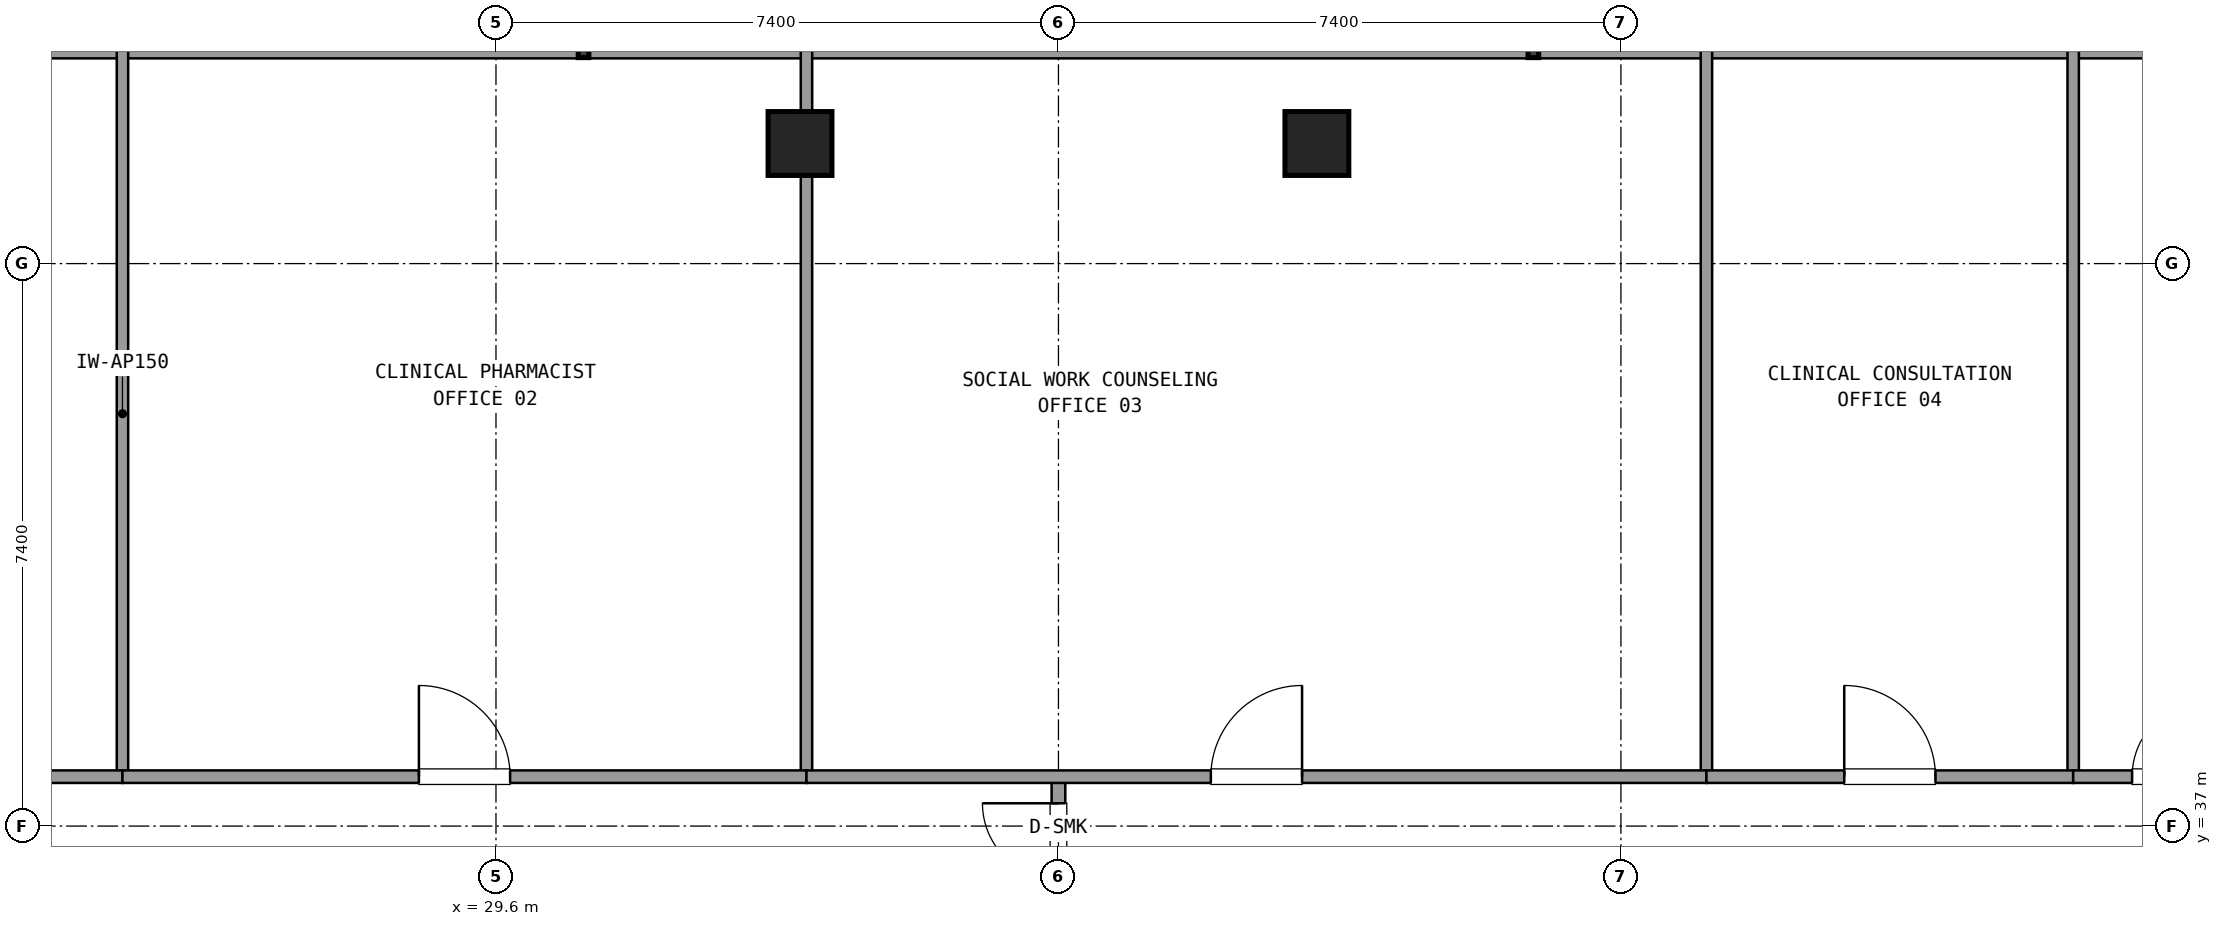
"""IFC4 building model, lengths in metres.
Left out: names, types, materials, properties, quantities, classifications, styles, units other than length and angle.
Written with IfcOpenShell. Run it as: python <this file> out.ifc"""

import sys

from ifc_helpers import new_model, si_unit, direction, frame, frame_2d, origin, origin_2d, place, context, subcontext, project, spatial, rectangle, extrude, element, fill, save


model = new_model("IFC4")
c1 = context("Model", 3, precision=1e-05, world=origin(), true_north=direction((0.0, 1.0)))
c2 = subcontext(c1, "Body", "Model", "MODEL_VIEW")
j1 = project(units=[si_unit("LENGTHUNIT", "METRE"), si_unit("PLANEANGLEUNIT", "RADIAN")], contexts=[c1])
p1 = place(None, origin())
s1 = spatial("IfcSite", under=j1, at=p1, CompositionType="ELEMENT")
p2 = place(p1, origin())
s2 = spatial("IfcBuilding", under=s1, at=p2, CompositionType="ELEMENT")
p3 = place(p2, frame((0.0, 0.0, 242.82)))
s3 = spatial("IfcBuildingStorey", under=s2, at=p3, CompositionType="ELEMENT", Elevation=242.82)
for number, where, z_axis, x_axis in (
    (1, (40.4, 45.98, 0.0), (0.0, 0.0, 1.0), (1.0, 0.0, 0.0)),
    (2, (33.6, 45.98, 0.0), (0.0, 0.0, 1.0), (1.0, 0.0, 0.0)),
):
    element("IfcColumn", number, at=place(p3, frame(where, z_axis=z_axis, x_axis=x_axis)), inside=s3, PredefinedType="COLUMN", context=c2, shape_type="SweptSolid", body=[
        extrude(rectangle(XDim=0.84, YDim=0.84, at=origin_2d()), origin(), (0.0, 0.0, 1.0), 3.6),
    ])
p4 = place(p3, frame((55.745, 47.22, 0.0), z_axis=(0.0, 0.0, 1.0), x_axis=(-1.0, 0.0, 0.0)))
e3 = element("IfcWall", 3, at=p4, inside=s3, PredefinedType="SOLIDWALL", context=c2, shape_type="SweptSolid", body=[
    extrude(rectangle(XDim=37.49, YDim=0.24, at=frame_2d((18.745, 0.0))), origin(), (0.0, 0.0, 1.0), 0.85),
])
p5 = place(p3, frame((37.0, 34.95, 0.0), z_axis=(0.0, 0.0, 1.0), x_axis=(0.0, 1.0, 0.0)))
e4 = element("IfcWall", 4, at=p5, inside=s3, PredefinedType="PARTITIONING", context=c2, shape_type="SweptSolid", body=[
    extrude(rectangle(XDim=2.7, YDim=0.18, at=frame_2d((1.35, 0.0))), origin(), (0.0, 0.0, 1.0), 2.61),
])
p6 = place(p5, frame((0.35, 0.0, 0.0)))
e5 = element("IfcOpeningElement", 5, at=p6, cuts=e4, PredefinedType="OPENING", context=c2, shape_type="SweptSolid", body=[
    extrude(rectangle(XDim=2.0, YDim=2.2, at=frame_2d((1.0, 1.1))), frame((0.0, 0.1, 0.0), z_axis=(0.0, -1.0, 0.0), x_axis=(1.0, 0.0, 0.0)), (0.0, 0.0, 1.0), 0.2),
])
p7 = place(p3, frame((24.686, 37.65, 0.0), z_axis=(0.0, 0.0, 1.0), x_axis=(0.0, 1.0, 0.0)))
e6 = element("IfcWall", 6, at=p7, inside=s3, PredefinedType="PARTITIONING", context=c2, shape_type="SweptSolid", body=[
    extrude(rectangle(XDim=9.55, YDim=0.15, at=frame_2d((4.775, 0.0))), origin(), (0.0, 0.0, 1.0), 2.61),
])
p8 = place(p3, frame((21.1, 37.65, 0.0), z_axis=(0.0, 0.0, 1.0), x_axis=(1.0, 0.0, 0.0)))
e7 = element("IfcWall", 7, at=p8, inside=s3, PredefinedType="PARTITIONING", context=c2, shape_type="SweptSolid", body=[
    extrude(rectangle(XDim=3.586, YDim=0.165, at=frame_2d((1.793, 0.0))), origin(), (0.0, 0.0, 1.0), 2.61),
])
p9 = place(p8, frame((1.193, 0.0, 0.0)))
e8 = element("IfcOpeningElement", 8, at=p9, cuts=e7, PredefinedType="OPENING", context=c2, shape_type="SweptSolid", body=[
    extrude(rectangle(XDim=1.2, YDim=2.15, at=frame_2d((0.6, 1.075))), frame((0.0, 0.093, 0.0), z_axis=(0.0, -1.0, 0.0), x_axis=(1.0, 0.0, 0.0)), (0.0, 0.0, 1.0), 0.185),
])
p10 = place(p3, frame((33.685, 37.65, 0.0), z_axis=(0.0, 0.0, 1.0), x_axis=(0.0, 1.0, 0.0)))
e9 = element("IfcWall", 9, at=p10, inside=s3, PredefinedType="PARTITIONING", context=c2, shape_type="SweptSolid", body=[
    extrude(rectangle(XDim=9.55, YDim=0.15, at=frame_2d((4.775, 0.0))), origin(), (0.0, 0.0, 1.0), 2.61),
])
p11 = place(p3, frame((24.686, 37.65, 0.0), z_axis=(0.0, 0.0, 1.0), x_axis=(1.0, 0.0, 0.0)))
e10 = element("IfcWall", 10, at=p11, inside=s3, PredefinedType="PARTITIONING", context=c2, shape_type="SweptSolid", body=[
    extrude(rectangle(XDim=8.999, YDim=0.165, at=frame_2d((4.5, 0.0))), origin(), (0.0, 0.0, 1.0), 2.61),
])
p12 = place(p11, frame((3.9, 0.0, 0.0)))
e11 = element("IfcOpeningElement", 11, at=p12, cuts=e10, PredefinedType="OPENING", context=c2, shape_type="SweptSolid", body=[
    extrude(rectangle(XDim=1.2, YDim=2.15, at=frame_2d((0.6, 1.075))), frame((0.0, 0.093, 0.0), z_axis=(0.0, -1.0, 0.0), x_axis=(1.0, 0.0, 0.0)), (0.0, 0.0, 1.0), 0.185),
])
p13 = place(p3, frame((45.525, 37.65, 0.0), z_axis=(0.0, 0.0, 1.0), x_axis=(0.0, 1.0, 0.0)))
e12 = element("IfcWall", 12, at=p13, inside=s3, PredefinedType="PARTITIONING", context=c2, shape_type="SweptSolid", body=[
    extrude(rectangle(XDim=9.55, YDim=0.15, at=frame_2d((4.775, 0.0))), origin(), (0.0, 0.0, 1.0), 2.61),
])
p14 = place(p3, frame((33.685, 37.65, 0.0), z_axis=(0.0, 0.0, 1.0), x_axis=(1.0, 0.0, 0.0)))
e13 = element("IfcWall", 13, at=p14, inside=s3, PredefinedType="PARTITIONING", context=c2, shape_type="SweptSolid", body=[
    extrude(rectangle(XDim=11.84, YDim=0.165, at=frame_2d((5.92, 0.0))), origin(), (0.0, 0.0, 1.0), 2.61),
])
p15 = place(p14, frame((5.32, 0.0, 0.0)))
e14 = element("IfcOpeningElement", 14, at=p15, cuts=e13, PredefinedType="OPENING", context=c2, shape_type="SweptSolid", body=[
    extrude(rectangle(XDim=1.2, YDim=2.15, at=frame_2d((0.6, 1.075))), frame((0.0, 0.093, 0.0), z_axis=(0.0, -1.0, 0.0), x_axis=(1.0, 0.0, 0.0)), (0.0, 0.0, 1.0), 0.185),
])
p16 = place(p3, frame((50.35, 37.65, 0.0), z_axis=(0.0, 0.0, 1.0), x_axis=(0.0, 1.0, 0.0)))
e15 = element("IfcWall", 15, at=p16, inside=s3, PredefinedType="PARTITIONING", context=c2, shape_type="SweptSolid", body=[
    extrude(rectangle(XDim=9.55, YDim=0.15, at=frame_2d((4.775, 0.0))), origin(), (0.0, 0.0, 1.0), 2.61),
])
p17 = place(p3, frame((45.525, 37.65, 0.0), z_axis=(0.0, 0.0, 1.0), x_axis=(1.0, 0.0, 0.0)))
e16 = element("IfcWall", 16, at=p17, inside=s3, PredefinedType="PARTITIONING", context=c2, shape_type="SweptSolid", body=[
    extrude(rectangle(XDim=4.825, YDim=0.165, at=frame_2d((2.413, 0.0))), origin(), (0.0, 0.0, 1.0), 2.61),
])
p18 = place(p17, frame((1.813, 0.0, 0.0)))
e17 = element("IfcOpeningElement", 17, at=p18, cuts=e16, PredefinedType="OPENING", context=c2, shape_type="SweptSolid", body=[
    extrude(rectangle(XDim=1.2, YDim=2.15, at=frame_2d((0.6, 1.075))), frame((0.0, 0.093, 0.0), z_axis=(0.0, -1.0, 0.0), x_axis=(1.0, 0.0, 0.0)), (0.0, 0.0, 1.0), 0.185),
])
p19 = place(p3, frame((50.35, 37.65, 0.0), z_axis=(0.0, 0.0, 1.0), x_axis=(1.0, 0.0, 0.0)))
e18 = element("IfcWall", 18, at=p19, inside=s3, PredefinedType="PARTITIONING", context=c2, shape_type="SweptSolid", body=[
    extrude(rectangle(XDim=2.55, YDim=0.165, at=frame_2d((1.275, 0.0))), origin(), (0.0, 0.0, 1.0), 2.61),
])
p20 = place(p19, frame((0.775, 0.0, 0.0)))
e19 = element("IfcOpeningElement", 19, at=p20, cuts=e18, PredefinedType="OPENING", context=c2, shape_type="SweptSolid", body=[
    extrude(rectangle(XDim=1.0, YDim=2.15, at=frame_2d((0.5, 1.075))), frame((0.0, 0.093, 0.0), z_axis=(0.0, -1.0, 0.0), x_axis=(1.0, 0.0, 0.0)), (0.0, 0.0, 1.0), 0.185),
])
p21 = place(p6, origin())
e20 = element("IfcDoor", 20, at=p21, inside=s3, OperationType="DOUBLE_DOOR_SINGLE_SWING", PredefinedType="DOOR", context=c2, shape_type="SweptSolid", body=[
    extrude(rectangle(XDim=2.0, YDim=2.2, at=frame_2d((1.0, 1.1))), frame((0.0, 0.025, 0.0), z_axis=(0.0, -1.0, 0.0), x_axis=(1.0, 0.0, 0.0)), (0.0, 0.0, 1.0), 0.05),
])
fill(e5, e20)
p22 = place(p12, origin())
e21 = element("IfcDoor", 21, at=p22, inside=s3, OperationType="SINGLE_SWING_LEFT", PredefinedType="DOOR", context=c2, shape_type="SweptSolid", body=[
    extrude(rectangle(XDim=1.2, YDim=2.15, at=frame_2d((0.6, 1.075))), frame((0.0, 0.025, 0.0), z_axis=(0.0, -1.0, 0.0), x_axis=(1.0, 0.0, 0.0)), (0.0, 0.0, 1.0), 0.05),
])
fill(e11, e21)
p23 = place(p15, origin())
e22 = element("IfcDoor", 22, at=p23, inside=s3, OperationType="SINGLE_SWING_RIGHT", PredefinedType="DOOR", context=c2, shape_type="SweptSolid", body=[
    extrude(rectangle(XDim=1.2, YDim=2.15, at=frame_2d((0.6, 1.075))), frame((0.0, 0.025, 0.0), z_axis=(0.0, -1.0, 0.0), x_axis=(1.0, 0.0, 0.0)), (0.0, 0.0, 1.0), 0.05),
])
fill(e14, e22)
p24 = place(p18, origin())
e23 = element("IfcDoor", 23, at=p24, inside=s3, OperationType="SINGLE_SWING_LEFT", PredefinedType="DOOR", context=c2, shape_type="SweptSolid", body=[
    extrude(rectangle(XDim=1.2, YDim=2.15, at=frame_2d((0.6, 1.075))), frame((0.0, 0.025, 0.0), z_axis=(0.0, -1.0, 0.0), x_axis=(1.0, 0.0, 0.0)), (0.0, 0.0, 1.0), 0.05),
])
fill(e17, e23)
p25 = place(p20, origin())
e24 = element("IfcDoor", 24, at=p25, inside=s3, OperationType="SINGLE_SWING_RIGHT", PredefinedType="DOOR", context=c2, shape_type="SweptSolid", body=[
    extrude(rectangle(XDim=1.0, YDim=2.15, at=frame_2d((0.5, 1.075))), frame((0.0, 0.025, 0.0), z_axis=(0.0, -1.0, 0.0), x_axis=(1.0, 0.0, 0.0)), (0.0, 0.0, 1.0), 0.05),
])
fill(e19, e24)
save(model, sys.argv[1])
